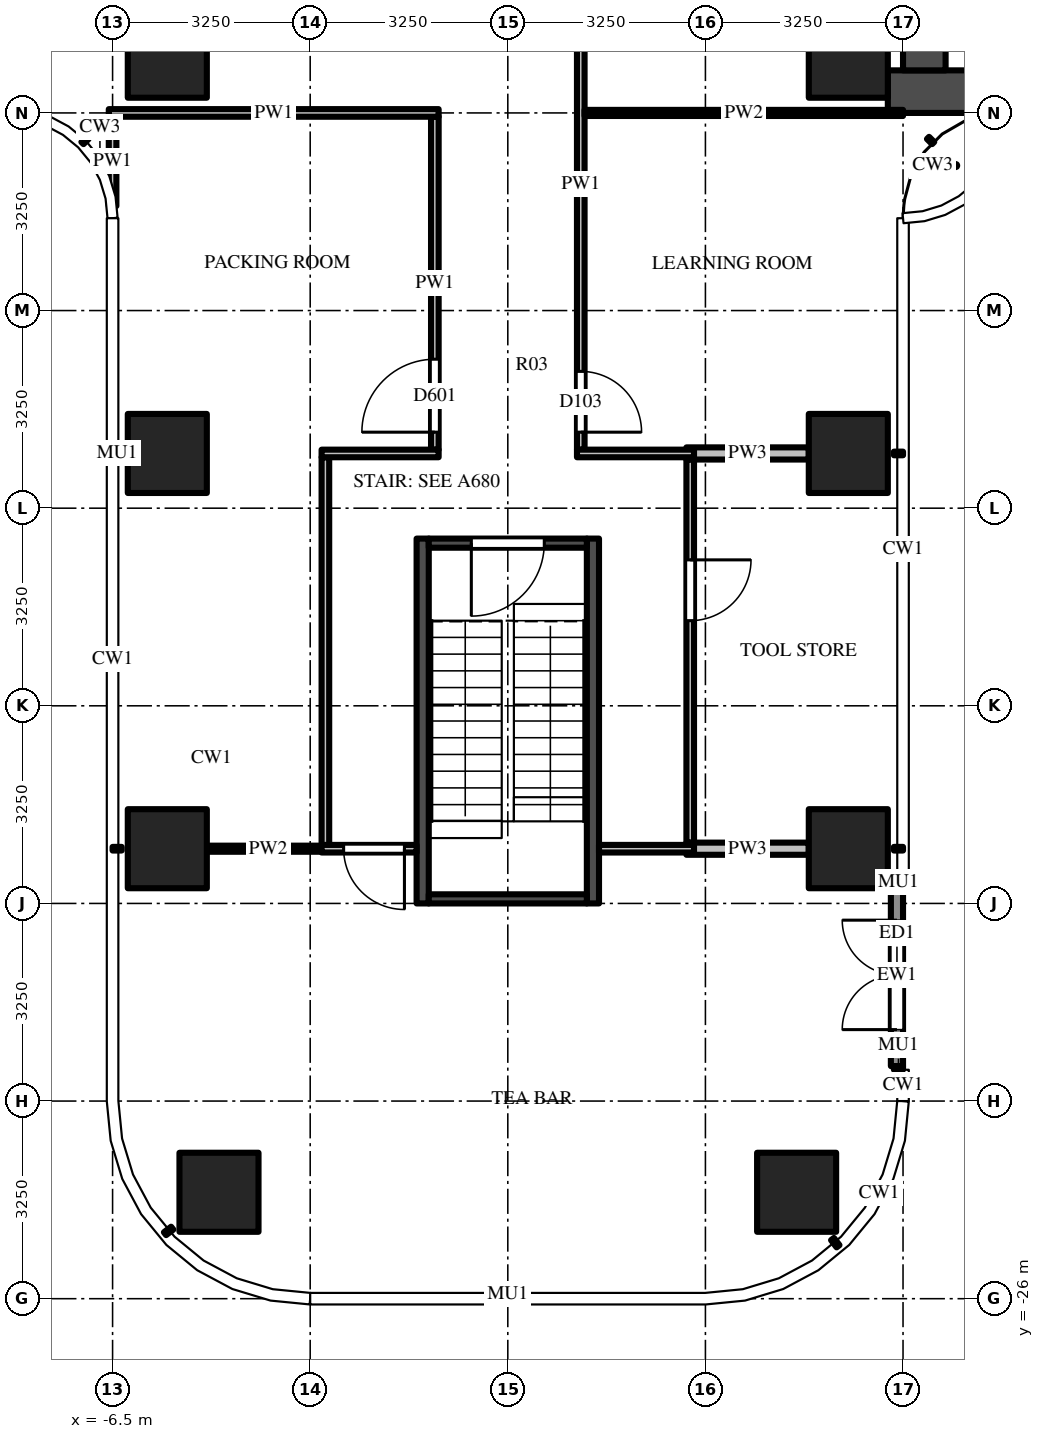
"""IFC4 building model, lengths in metres.
Left out: names, types, materials, properties, quantities, classifications, styles, units other than length and angle.
Written with IfcOpenShell. Run it as: python <this file> out.ifc"""

import sys

from ifc_helpers import new_model, si_unit, direction, frame, frame_2d, origin, origin_2d, place, context, subcontext, project, spatial, rectangle, extrude, source, transform, mapped, element, fill, save


model = new_model("IFC4")
c1 = context("Model", 3, precision=1e-05, world=origin(), true_north=direction((0.0, 1.0)))
c2 = subcontext(c1, "Body", "Model", "MODEL_VIEW")
j1 = project(units=[si_unit("LENGTHUNIT", "METRE"), si_unit("PLANEANGLEUNIT", "RADIAN")], contexts=[c1])
p1 = place(None, origin())
s1 = spatial("IfcSite", under=j1, at=p1, CompositionType="ELEMENT")
p2 = place(p1, origin())
s2 = spatial("IfcBuilding", under=s1, at=p2, CompositionType="ELEMENT")
p3 = place(p2, frame((0.0, 0.0, 138.0)))
s3 = spatial("IfcBuildingStorey", under=s2, at=p3, CompositionType="ELEMENT", Elevation=138.0)
m1 = source(origin(), c2, "Body", "SweptSolid", [
    extrude(rectangle(XDim=1.3, YDim=1.3, at=origin_2d()), origin(), (0.0, 0.0, 1.0), 4.5),
])
for number, where, z_axis, x_axis in (
    (1, (5.6, -5.6, 0.0), (0.0, 0.0, 1.0), (1.0, 0.0, 0.0)),
    (2, (-5.6, -5.6, 0.0), (0.0, 0.0, 1.0), (1.0, 0.0, 0.0)),
    (3, (5.6, -12.1, 0.0), (0.0, 0.0, 1.0), (1.0, 0.0, 0.0)),
    (4, (5.6, -18.6, 0.0), (0.0, 0.0, 1.0), (1.0, 0.0, 0.0)),
    (5, (4.75, -24.25, 0.0), (0.0, 0.0, 1.0), (1.0, 0.0, 0.0)),
    (6, (-5.6, -12.1, 0.0), (0.0, 0.0, 1.0), (1.0, 0.0, 0.0)),
    (7, (-5.6, -18.6, 0.0), (0.0, 0.0, 1.0), (1.0, 0.0, 0.0)),
    (8, (-4.75, -24.25, 0.0), (0.0, 0.0, 1.0), (1.0, 0.0, 0.0)),
):
    element("IfcColumn", number, at=place(p3, frame(where, z_axis=z_axis, x_axis=x_axis)), inside=s3, PredefinedType="COLUMN", context=c2, shape_type="MappedRepresentation", body=[
        mapped(m1, transform((0.0, 0.0, 0.0))),
    ])
m2 = source(origin(), c2, "Body", "SweptSolid", [
    extrude(rectangle(XDim=16.5, YDim=0.7, at=frame_2d((8.25, 0.0))), origin(), (0.0, 0.0, 1.0), 4.25),
])
p4 = place(p3, frame((6.25, -6.15, 0.0), z_axis=(0.0, 0.0, 1.0), x_axis=(1.0, 0.0, 0.0)))
e9 = element("IfcWall", 9, at=p4, inside=s3, PredefinedType="SHEAR", context=c2, shape_type="MappedRepresentation", body=[
    mapped(m2, transform((0.0, 0.0, 0.0))),
])
m3 = source(origin(), c2, "Body", "SweptSolid", [
    extrude(rectangle(XDim=9.05, YDim=0.7, at=frame_2d((4.525, 0.0))), origin(), (0.0, 0.0, 1.0), 4.25),
])
p5 = place(p3, frame((6.85, -5.8, 0.0), z_axis=(0.0, 0.0, 1.0), x_axis=(0.0, 1.0, 0.0)))
e10 = element("IfcWall", 10, at=p5, inside=s3, PredefinedType="SHEAR", context=c2, shape_type="MappedRepresentation", body=[
    mapped(m3, transform((0.0, 0.0, 0.0))),
])
m4 = source(origin(), c2, "Body", "SweptSolid", [
    extrude(rectangle(XDim=1.8, YDim=2.1, at=frame_2d((0.9, 1.05))), frame((0.0, 0.36, 0.0), z_axis=(0.0, -1.0, 0.0), x_axis=(1.0, 0.0, 0.0)), (0.0, 0.0, 1.0), 0.72),
])
p6 = place(p5, frame((3.15, 0.0, 0.0)))
e11 = element("IfcOpeningElement", 11, at=p6, cuts=e10, PredefinedType="OPENING", context=c2, shape_type="MappedRepresentation", body=[
    mapped(m4, transform((0.0, 0.0, 0.0))),
])
m5 = source(origin(), c2, "Body", "SweptSolid", [
    extrude(rectangle(XDim=6.0, YDim=0.2, at=frame_2d((3.0, 0.0))), origin(), (0.0, 0.0, 1.0), 4.25),
])
for number, where, z_axis, x_axis in (
    (12, (1.4, -13.5, 0.0), (0.0, 0.0, 1.0), (0.0, -1.0, 0.0)),
    (13, (-1.4, -13.5, 0.0), (0.0, 0.0, 1.0), (0.0, -1.0, 0.0)),
):
    element("IfcWall", number, at=place(p3, frame(where, z_axis=z_axis, x_axis=x_axis)), inside=s3, PredefinedType="SHEAR", context=c2, shape_type="MappedRepresentation", body=[
        mapped(m5, transform((0.0, 0.0, 0.0))),
    ])
m6 = source(origin(), c2, "Body", "SweptSolid", [
    extrude(rectangle(XDim=2.6, YDim=0.15, at=frame_2d((1.3, 0.0))), origin(), (0.0, 0.0, 1.0), 4.25),
])
p7 = place(p3, frame((1.3, -13.575, 0.0), z_axis=(0.0, 0.0, 1.0), x_axis=(-1.0, 0.0, 0.0)))
e14 = element("IfcWall", 14, at=p7, inside=s3, PredefinedType="SHEAR", context=c2, shape_type="MappedRepresentation", body=[
    mapped(m6, transform((0.0, 0.0, 0.0))),
])
m7 = source(origin(), c2, "Body", "SweptSolid", [
    extrude(rectangle(XDim=1.2, YDim=2.1, at=frame_2d((0.6, 1.05))), frame((0.0, 0.085, 0.0), z_axis=(0.0, -1.0, 0.0), x_axis=(1.0, 0.0, 0.0)), (0.0, 0.0, 1.0), 0.17),
])
p8 = place(p7, frame((0.7, 0.0, 0.0)))
e15 = element("IfcOpeningElement", 15, at=p8, cuts=e14, PredefinedType="OPENING", context=c2, shape_type="MappedRepresentation", body=[
    mapped(m7, transform((0.0, 0.0, 0.0))),
])
p9 = place(p3, frame((1.3, -19.425, 0.0), z_axis=(0.0, 0.0, 1.0), x_axis=(-1.0, 0.0, 0.0)))
e16 = element("IfcWall", 16, at=p9, inside=s3, PredefinedType="SHEAR", context=c2, shape_type="MappedRepresentation", body=[
    mapped(m6, transform((0.0, 0.0, 0.0))),
])
m8 = source(origin(), c2, "Body", "SweptSolid", [
    extrude(rectangle(XDim=3.0, YDim=0.2, at=frame_2d((1.5, 0.0))), origin(), (0.0, 0.0, 1.0), 4.25),
])
p10 = place(p3, frame((6.4, -22.175, 0.0), z_axis=(0.0, 0.0, 1.0), x_axis=(0.0, 1.0, 0.0)))
e17 = element("IfcWall", 17, at=p10, inside=s3, PredefinedType="SOLIDWALL", context=c2, shape_type="MappedRepresentation", body=[
    mapped(m8, transform((0.0, 0.0, 0.0))),
])
m9 = source(origin(), c2, "Body", "SweptSolid", [
    extrude(rectangle(XDim=1.8, YDim=2.4, at=frame_2d((0.9, 1.2))), frame((0.0, 0.11, 0.0), z_axis=(0.0, -1.0, 0.0), x_axis=(1.0, 0.0, 0.0)), (0.0, 0.0, 1.0), 0.22),
])
p11 = place(p10, frame((0.6, 0.0, 0.0)))
e18 = element("IfcOpeningElement", 18, at=p11, cuts=e17, PredefinedType="OPENING", context=c2, shape_type="MappedRepresentation", body=[
    mapped(m9, transform((0.0, 0.0, 0.0))),
])
m10 = source(origin(), c2, "Body", "SweptSolid", [
    extrude(rectangle(XDim=1.469, YDim=0.125, at=frame_2d((0.734, 0.0))), origin(), (0.0, 0.0, 1.0), 4.25),
])
p12 = place(p3, frame((-6.5, -6.562, 0.0), z_axis=(0.0, 0.0, 1.0), x_axis=(0.0, -1.0, 0.0)))
e19 = element("IfcWall", 19, at=p12, inside=s3, PredefinedType="PARTITIONING", context=c2, shape_type="MappedRepresentation", body=[
    mapped(m10, transform((0.0, 0.0, 0.0))),
])
m11 = source(origin(), c2, "Body", "SweptSolid", [
    extrude(rectangle(XDim=6.387, YDim=0.125, at=frame_2d((3.194, 0.0))), origin(), (0.0, 0.0, 1.0), 3.468),
])
p13 = place(p3, frame((-3.0, -18.55, 0.0), z_axis=(0.0, 0.0, 1.0), x_axis=(0.0, 1.0, 0.0)))
e20 = element("IfcWall", 20, at=p13, inside=s3, PredefinedType="PARTITIONING", context=c2, shape_type="MappedRepresentation", body=[
    mapped(m11, transform((0.0, 0.0, 0.0))),
])
m12 = source(origin(), c2, "Body", "SweptSolid", [
    extrude(rectangle(XDim=5.475, YDim=0.125, at=frame_2d((2.738, 0.0))), origin(), (0.0, 0.0, 1.0), 3.468),
])
p14 = place(p3, frame((-1.2, -12.038, 0.0), z_axis=(0.0, 0.0, 1.0), x_axis=(0.0, 1.0, 0.0)))
e21 = element("IfcWall", 21, at=p14, inside=s3, PredefinedType="PARTITIONING", context=c2, shape_type="MappedRepresentation", body=[
    mapped(m12, transform((0.0, 0.0, 0.0))),
])
m13 = source(origin(), c2, "Body", "SweptSolid", [
    extrude(rectangle(XDim=1.2, YDim=2.1, at=frame_2d((0.6, 1.05))), frame((0.0, 0.073, 0.0), z_axis=(0.0, -1.0, 0.0), x_axis=(1.0, 0.0, 0.0)), (0.0, 0.0, 1.0), 0.145),
])
p15 = place(p14, frame((0.288, 0.0, 0.0)))
e22 = element("IfcOpeningElement", 22, at=p15, cuts=e21, PredefinedType="OPENING", context=c2, shape_type="MappedRepresentation", body=[
    mapped(m13, transform((0.0, 0.0, 0.0))),
])
m14 = source(origin(), c2, "Body", "SweptSolid", [
    extrude(rectangle(XDim=8.725, YDim=0.125, at=frame_2d((4.363, 0.0))), origin(), (0.0, 0.0, 1.0), 3.468),
])
p16 = place(p3, frame((1.2, -3.312, 0.0), z_axis=(0.0, 0.0, 1.0), x_axis=(0.0, -1.0, 0.0)))
e23 = element("IfcWall", 23, at=p16, inside=s3, PredefinedType="PARTITIONING", context=c2, shape_type="MappedRepresentation", body=[
    mapped(m14, transform((0.0, 0.0, 0.0))),
])
m15 = source(origin(), c2, "Body", "SweptSolid", [
    extrude(rectangle(XDim=1.0, YDim=2.1, at=frame_2d((0.5, 1.05))), frame((0.0, 0.073, 0.0), z_axis=(0.0, -1.0, 0.0), x_axis=(1.0, 0.0, 0.0)), (0.0, 0.0, 1.0), 0.145),
])
p17 = place(p16, frame((7.438, 0.0, 0.0)))
e24 = element("IfcOpeningElement", 24, at=p17, cuts=e23, PredefinedType="OPENING", context=c2, shape_type="MappedRepresentation", body=[
    mapped(m15, transform((0.0, 0.0, 0.0))),
])
m16 = source(origin(), c2, "Body", "SweptSolid", [
    extrude(rectangle(XDim=6.3, YDim=0.125, at=frame_2d((3.15, 0.0))), origin(), (0.0, 0.0, 1.0), 3.468),
])
p18 = place(p3, frame((3.0, -12.2, 0.0), z_axis=(0.0, 0.0, 1.0), x_axis=(0.0, -1.0, 0.0)))
e25 = element("IfcWall", 25, at=p18, inside=s3, PredefinedType="PARTITIONING", context=c2, shape_type="MappedRepresentation", body=[
    mapped(m16, transform((0.0, 0.0, 0.0))),
])
p19 = place(p18, frame((1.65, 0.0, 0.0)))
e26 = element("IfcOpeningElement", 26, at=p19, cuts=e25, PredefinedType="OPENING", context=c2, shape_type="MappedRepresentation", body=[
    mapped(m15, transform((0.0, 0.0, 0.0))),
])
m17 = source(origin(), c2, "Body", "SweptSolid", [
    extrude(rectangle(XDim=2.012, YDim=0.2, at=frame_2d((1.006, 0.0))), origin(), (0.0, 0.0, 1.0), 3.697),
])
p20 = place(p3, frame((2.938, -18.6, 0.0), z_axis=(0.0, 0.0, 1.0), x_axis=(1.0, 0.0, 0.0)))
e27 = element("IfcWall", 27, at=p20, inside=s3, PredefinedType="PARTITIONING", context=c2, shape_type="MappedRepresentation", body=[
    mapped(m17, transform((0.0, 0.0, 0.0))),
])
m18 = source(origin(), c2, "Body", "SweptSolid", [
    extrude(rectangle(XDim=2.012, YDim=0.1, at=frame_2d((1.006, 0.0))), origin(), (0.0, 0.0, 1.0), 3.697),
])
p21 = place(p3, frame((-4.95, -18.6, 0.0), z_axis=(0.0, 0.0, 1.0), x_axis=(1.0, 0.0, 0.0)))
e28 = element("IfcWall", 28, at=p21, inside=s3, PredefinedType="PARTITIONING", context=c2, shape_type="MappedRepresentation", body=[
    mapped(m18, transform((0.0, 0.0, 0.0))),
])
m19 = source(origin(), c2, "Body", "SweptSolid", [
    extrude(rectangle(XDim=1.562, YDim=0.125, at=frame_2d((0.781, 0.0))), origin(), (0.0, 0.0, 1.0), 3.697),
])
p22 = place(p3, frame((-1.5, -18.6, 0.0), z_axis=(0.0, 0.0, 1.0), x_axis=(-1.0, 0.0, 0.0)))
e29 = element("IfcWall", 29, at=p22, inside=s3, PredefinedType="PARTITIONING", context=c2, shape_type="MappedRepresentation", body=[
    mapped(m19, transform((0.0, 0.0, 0.0))),
])
p23 = place(p22, frame((0.2, 0.0, 0.0)))
e30 = element("IfcOpeningElement", 30, at=p23, cuts=e29, PredefinedType="OPENING", context=c2, shape_type="MappedRepresentation", body=[
    mapped(m15, transform((0.0, 0.0, 0.0))),
])
p24 = place(p3, frame((3.062, -18.6, 0.0), z_axis=(0.0, 0.0, 1.0), x_axis=(-1.0, 0.0, 0.0)))
e31 = element("IfcWall", 31, at=p24, inside=s3, PredefinedType="PARTITIONING", context=c2, shape_type="MappedRepresentation", body=[
    mapped(m19, transform((0.0, 0.0, 0.0))),
])
m20 = source(origin(), c2, "Body", "SweptSolid", [
    extrude(rectangle(XDim=2.012, YDim=0.2, at=frame_2d((1.006, 0.0))), origin(), (0.0, 0.0, 1.0), 3.468),
])
p25 = place(p3, frame((2.938, -12.1, 0.0), z_axis=(0.0, 0.0, 1.0), x_axis=(1.0, 0.0, 0.0)))
e32 = element("IfcWall", 32, at=p25, inside=s3, PredefinedType="PARTITIONING", context=c2, shape_type="MappedRepresentation", body=[
    mapped(m20, transform((0.0, 0.0, 0.0))),
])
m21 = source(origin(), c2, "Body", "SweptSolid", [
    extrude(rectangle(XDim=1.925, YDim=0.125, at=frame_2d((0.962, 0.0))), origin(), (0.0, 0.0, 1.0), 3.468),
])
for number, where, z_axis, x_axis in (
    (33, (-3.062, -12.1, 0.0), (0.0, 0.0, 1.0), (1.0, 0.0, 0.0)),
    (34, (1.137, -12.1, 0.0), (0.0, 0.0, 1.0), (1.0, 0.0, 0.0)),
):
    element("IfcWall", number, at=place(p3, frame(where, z_axis=z_axis, x_axis=x_axis)), inside=s3, PredefinedType="PARTITIONING", context=c2, shape_type="MappedRepresentation", body=[
        mapped(m21, transform((0.0, 0.0, 0.0))),
    ])
m22 = source(origin(), c2, "Body", "SweptSolid", [
    extrude(rectangle(XDim=5.238, YDim=0.1, at=frame_2d((2.619, 0.0))), origin(), (0.0, 0.0, 1.0), 3.33),
])
p26 = place(p3, frame((1.262, -6.5, 0.0), z_axis=(0.0, 0.0, 1.0), x_axis=(1.0, 0.0, 0.0)))
e35 = element("IfcWall", 35, at=p26, inside=s3, PredefinedType="PARTITIONING", context=c2, shape_type="MappedRepresentation", body=[
    mapped(m22, transform((0.0, 0.0, 0.0))),
])
m23 = source(origin(), c2, "Body", "SweptSolid", [
    extrude(rectangle(XDim=5.425, YDim=0.125, at=frame_2d((2.712, 0.0))), origin(), (0.0, 0.0, 1.0), 3.33),
])
p27 = place(p3, frame((-1.137, -6.5, 0.0), z_axis=(0.0, 0.0, 1.0), x_axis=(-1.0, 0.0, 0.0)))
e36 = element("IfcWall", 36, at=p27, inside=s3, PredefinedType="PARTITIONING", context=c2, shape_type="MappedRepresentation", body=[
    mapped(m23, transform((0.0, 0.0, 0.0))),
])
m24 = source(origin(), c2, "Body", "SweptSolid", [
    extrude(rectangle(XDim=1.2, YDim=2.1, at=frame_2d((0.6, 1.05))), frame((0.0, 0.025, 0.0), z_axis=(0.0, -1.0, 0.0), x_axis=(1.0, 0.0, 0.0)), (0.0, 0.0, 1.0), 0.05),
])
p28 = place(p8, origin())
e37 = element("IfcDoor", 37, at=p28, inside=s3, OperationType="SINGLE_SWING_RIGHT", PredefinedType="DOOR", context=c2, shape_type="MappedRepresentation", body=[
    mapped(m24, transform((0.0, 0.0, 0.0))),
])
fill(e15, e37)
m25 = source(origin(), c2, "Body", "SweptSolid", [
    extrude(rectangle(XDim=1.8, YDim=2.4, at=frame_2d((0.9, 1.2))), frame((0.0, 0.025, 0.0), z_axis=(0.0, -1.0, 0.0), x_axis=(1.0, 0.0, 0.0)), (0.0, 0.0, 1.0), 0.05),
])
p29 = place(p11, origin())
e38 = element("IfcDoor", 38, at=p29, inside=s3, OperationType="DOUBLE_DOOR_SINGLE_SWING", PredefinedType="DOOR", context=c2, shape_type="MappedRepresentation", body=[
    mapped(m25, transform((0.0, 0.0, 0.0))),
])
fill(e18, e38)
m26 = source(origin(), c2, "Body", "SweptSolid", [
    extrude(rectangle(XDim=1.0, YDim=2.1, at=frame_2d((0.5, 1.05))), frame((0.0, 0.025, 0.0), z_axis=(0.0, -1.0, 0.0), x_axis=(1.0, 0.0, 0.0)), (0.0, 0.0, 1.0), 0.05),
])
p30 = place(p23, origin())
e39 = element("IfcDoor", 39, at=p30, inside=s3, OperationType="SINGLE_SWING_LEFT", PredefinedType="DOOR", context=c2, shape_type="MappedRepresentation", body=[
    mapped(m26, transform((0.0, 0.0, 0.0))),
])
fill(e30, e39)
p31 = place(p19, origin())
e40 = element("IfcDoor", 40, at=p31, inside=s3, OperationType="SINGLE_SWING_LEFT", PredefinedType="DOOR", context=c2, shape_type="MappedRepresentation", body=[
    mapped(m26, transform((0.0, 0.0, 0.0))),
])
fill(e26, e40)
p32 = place(p17, origin())
e41 = element("IfcDoor", 41, at=p32, inside=s3, OperationType="SINGLE_SWING_RIGHT", PredefinedType="DOOR", context=c2, shape_type="MappedRepresentation", body=[
    mapped(m26, transform((0.0, 0.0, 0.0))),
])
fill(e24, e41)
p33 = place(p15, origin())
e42 = element("IfcDoor", 42, at=p33, inside=s3, OperationType="SINGLE_SWING_LEFT", PredefinedType="DOOR", context=c2, shape_type="MappedRepresentation", body=[
    mapped(m24, transform((0.0, 0.0, 0.0))),
])
fill(e22, e42)
save(model, sys.argv[1])
